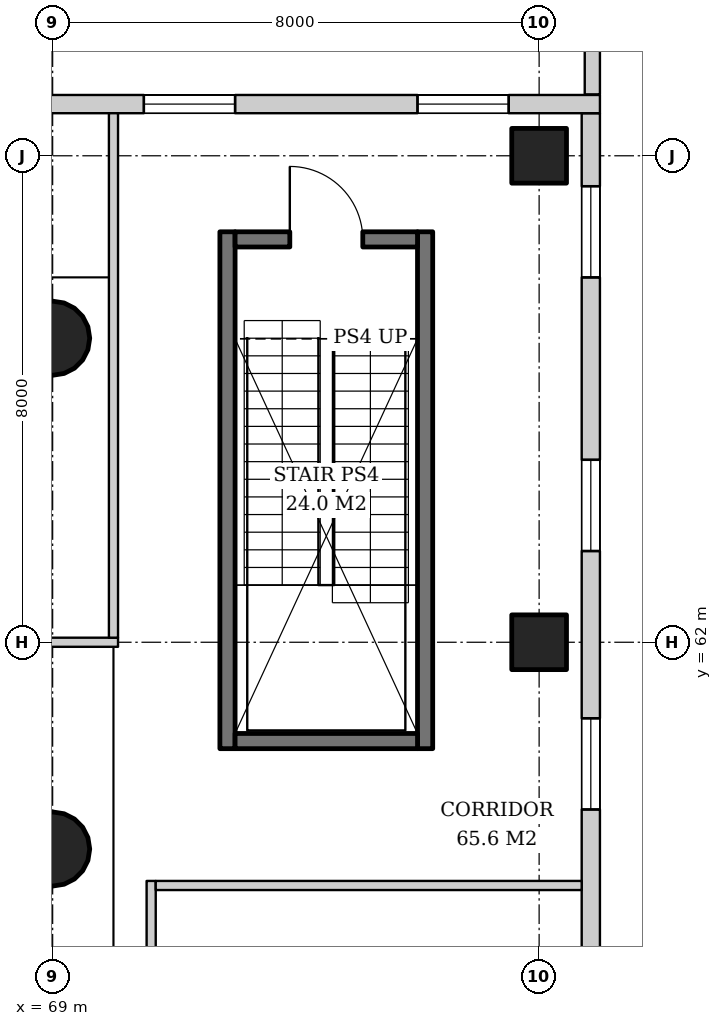
"""IFC4 building model, lengths in metres.
Left out: names, types, materials, properties, quantities, classifications, styles, units other than length and angle.
Written with IfcOpenShell. Run it as: python <this file> out.ifc"""

import sys

from ifc_helpers import new_model, si_unit, direction, frame, frame_2d, origin, origin_2d, place, context, subcontext, project, spatial, rectangle, hollow_circle, extrude, element, fill, save


model = new_model("IFC4")
c1 = context("Model", 3, precision=1e-05, world=origin(), true_north=direction((0.0, 1.0)))
c2 = subcontext(c1, "Body", "Model", "MODEL_VIEW")
j1 = project(units=[si_unit("LENGTHUNIT", "METRE"), si_unit("PLANEANGLEUNIT", "RADIAN")], contexts=[c1])
p1 = place(None, origin())
s1 = spatial("IfcSite", under=j1, at=p1, CompositionType="ELEMENT")
p2 = place(p1, origin())
s2 = spatial("IfcBuilding", under=s1, at=p2, CompositionType="ELEMENT")
p3 = place(p2, frame((0.0, 0.0, 16.0)))
s3 = spatial("IfcBuildingStorey", under=s2, at=p3, CompositionType="ELEMENT", Elevation=16.0)
for number, where, z_axis, x_axis in (
    (1, (77.0, 62.0, 0.0), (0.0, 0.0, 1.0), (1.0, 0.0, 0.0)),
    (2, (77.0, 70.0, 0.0), (0.0, 0.0, 1.0), (1.0, 0.0, 0.0)),
):
    element("IfcColumn", number, at=place(p3, frame(where, z_axis=z_axis, x_axis=x_axis)), inside=s3, PredefinedType="COLUMN", context=c2, shape_type="SweptSolid", body=[
        extrude(rectangle(XDim=0.9, YDim=0.9, at=origin_2d()), origin(), (0.0, 0.0, 1.0), 5.0),
    ])
for number, where, z_axis, x_axis in (
    (3, (69.0, 67.0, 0.0), (0.0, 0.0, 1.0), (1.0, 0.0, 0.0)),
    (4, (69.0, 58.6, 0.0), (0.0, 0.0, 1.0), (1.0, 0.0, 0.0)),
):
    element("IfcColumn", number, at=place(p3, frame(where, z_axis=z_axis, x_axis=x_axis)), inside=s3, PredefinedType="COLUMN", context=c2, shape_type="SweptSolid", body=[
        extrude(hollow_circle(Radius=0.61, WallThickness=0.04, at=origin_2d()), origin(), (0.0, 0.0, 1.0), 5.0),
    ])
p4 = place(p3, frame((77.85, 21.3, 0.0), z_axis=(0.0, 0.0, 1.0), x_axis=(0.0, 1.0, 0.0)))
e5 = element("IfcWall", 5, at=p4, inside=s3, PredefinedType="SOLIDWALL", context=c2, shape_type="SweptSolid", body=[
    extrude(rectangle(XDim=49.4, YDim=0.3, at=frame_2d((24.7, 0.0))), origin(), (0.0, 0.0, 1.0), 4.7),
])
p5 = place(p4, frame((1.2, 0.0, 0.9)))
e6 = element("IfcOpeningElement", 6, at=p5, cuts=e5, PredefinedType="OPENING", context=c2, shape_type="SweptSolid", body=[
    extrude(rectangle(XDim=1.5, YDim=3.2, at=frame_2d((0.75, 1.6))), frame((0.0, 0.16, 0.0), z_axis=(0.0, -1.0, 0.0), x_axis=(1.0, 0.0, 0.0)), (0.0, 0.0, 1.0), 0.32),
])
p6 = place(p4, frame((5.7, 0.0, 0.9)))
e7 = element("IfcOpeningElement", 7, at=p6, cuts=e5, PredefinedType="OPENING", context=c2, shape_type="SweptSolid", body=[
    extrude(rectangle(XDim=1.5, YDim=3.2, at=frame_2d((0.75, 1.6))), frame((0.0, 0.16, 0.0), z_axis=(0.0, -1.0, 0.0), x_axis=(1.0, 0.0, 0.0)), (0.0, 0.0, 1.0), 0.32),
])
p7 = place(p4, frame((9.95, 0.0, 0.9)))
e8 = element("IfcOpeningElement", 8, at=p7, cuts=e5, PredefinedType="OPENING", context=c2, shape_type="SweptSolid", body=[
    extrude(rectangle(XDim=1.5, YDim=3.2, at=frame_2d((0.75, 1.6))), frame((0.0, 0.16, 0.0), z_axis=(0.0, -1.0, 0.0), x_axis=(1.0, 0.0, 0.0)), (0.0, 0.0, 1.0), 0.32),
])
p8 = place(p4, frame((13.95, 0.0, 0.9)))
e9 = element("IfcOpeningElement", 9, at=p8, cuts=e5, PredefinedType="OPENING", context=c2, shape_type="SweptSolid", body=[
    extrude(rectangle(XDim=1.5, YDim=3.2, at=frame_2d((0.75, 1.6))), frame((0.0, 0.16, 0.0), z_axis=(0.0, -1.0, 0.0), x_axis=(1.0, 0.0, 0.0)), (0.0, 0.0, 1.0), 0.32),
])
p9 = place(p4, frame((17.95, 0.0, 0.9)))
e10 = element("IfcOpeningElement", 10, at=p9, cuts=e5, PredefinedType="OPENING", context=c2, shape_type="SweptSolid", body=[
    extrude(rectangle(XDim=1.5, YDim=3.2, at=frame_2d((0.75, 1.6))), frame((0.0, 0.16, 0.0), z_axis=(0.0, -1.0, 0.0), x_axis=(1.0, 0.0, 0.0)), (0.0, 0.0, 1.0), 0.32),
])
p10 = place(p4, frame((21.95, 0.0, 0.9)))
e11 = element("IfcOpeningElement", 11, at=p10, cuts=e5, PredefinedType="OPENING", context=c2, shape_type="SweptSolid", body=[
    extrude(rectangle(XDim=1.5, YDim=3.2, at=frame_2d((0.75, 1.6))), frame((0.0, 0.16, 0.0), z_axis=(0.0, -1.0, 0.0), x_axis=(1.0, 0.0, 0.0)), (0.0, 0.0, 1.0), 0.32),
])
p11 = place(p4, frame((25.95, 0.0, 0.9)))
e12 = element("IfcOpeningElement", 12, at=p11, cuts=e5, PredefinedType="OPENING", context=c2, shape_type="SweptSolid", body=[
    extrude(rectangle(XDim=1.5, YDim=3.2, at=frame_2d((0.75, 1.6))), frame((0.0, 0.16, 0.0), z_axis=(0.0, -1.0, 0.0), x_axis=(1.0, 0.0, 0.0)), (0.0, 0.0, 1.0), 0.32),
])
p12 = place(p4, frame((29.95, 0.0, 0.9)))
e13 = element("IfcOpeningElement", 13, at=p12, cuts=e5, PredefinedType="OPENING", context=c2, shape_type="SweptSolid", body=[
    extrude(rectangle(XDim=1.5, YDim=3.2, at=frame_2d((0.75, 1.6))), frame((0.0, 0.16, 0.0), z_axis=(0.0, -1.0, 0.0), x_axis=(1.0, 0.0, 0.0)), (0.0, 0.0, 1.0), 0.32),
])
p13 = place(p4, frame((33.95, 0.0, 0.9)))
e14 = element("IfcOpeningElement", 14, at=p13, cuts=e5, PredefinedType="OPENING", context=c2, shape_type="SweptSolid", body=[
    extrude(rectangle(XDim=1.5, YDim=3.2, at=frame_2d((0.75, 1.6))), frame((0.0, 0.16, 0.0), z_axis=(0.0, -1.0, 0.0), x_axis=(1.0, 0.0, 0.0)), (0.0, 0.0, 1.0), 0.32),
])
p14 = place(p4, frame((37.95, 0.0, 0.9)))
e15 = element("IfcOpeningElement", 15, at=p14, cuts=e5, PredefinedType="OPENING", context=c2, shape_type="SweptSolid", body=[
    extrude(rectangle(XDim=1.5, YDim=3.2, at=frame_2d((0.75, 1.6))), frame((0.0, 0.16, 0.0), z_axis=(0.0, -1.0, 0.0), x_axis=(1.0, 0.0, 0.0)), (0.0, 0.0, 1.0), 0.32),
])
p15 = place(p4, frame((42.2, 0.0, 0.9)))
e16 = element("IfcOpeningElement", 16, at=p15, cuts=e5, PredefinedType="OPENING", context=c2, shape_type="SweptSolid", body=[
    extrude(rectangle(XDim=1.5, YDim=3.2, at=frame_2d((0.75, 1.6))), frame((0.0, 0.16, 0.0), z_axis=(0.0, -1.0, 0.0), x_axis=(1.0, 0.0, 0.0)), (0.0, 0.0, 1.0), 0.32),
])
p16 = place(p4, frame((46.7, 0.0, 0.9)))
e17 = element("IfcOpeningElement", 17, at=p16, cuts=e5, PredefinedType="OPENING", context=c2, shape_type="SweptSolid", body=[
    extrude(rectangle(XDim=1.5, YDim=3.2, at=frame_2d((0.75, 1.6))), frame((0.0, 0.16, 0.0), z_axis=(0.0, -1.0, 0.0), x_axis=(1.0, 0.0, 0.0)), (0.0, 0.0, 1.0), 0.32),
])
p17 = place(p3, frame((78.0, 70.85, 0.0), z_axis=(0.0, 0.0, 1.0), x_axis=(-1.0, 0.0, 0.0)))
e18 = element("IfcWall", 18, at=p17, inside=s3, PredefinedType="SOLIDWALL", context=c2, shape_type="SweptSolid", body=[
    extrude(rectangle(XDim=58.0, YDim=0.3, at=frame_2d((29.0, 0.0))), origin(), (0.0, 0.0, 1.0), 4.7),
])
p18 = place(p17, frame((1.5, 0.0, 0.9)))
e19 = element("IfcOpeningElement", 19, at=p18, cuts=e18, PredefinedType="OPENING", context=c2, shape_type="SweptSolid", body=[
    extrude(rectangle(XDim=1.5, YDim=3.2, at=frame_2d((0.75, 1.6))), frame((0.0, 0.16, 0.0), z_axis=(0.0, -1.0, 0.0), x_axis=(1.0, 0.0, 0.0)), (0.0, 0.0, 1.0), 0.32),
])
p19 = place(p17, frame((6.0, 0.0, 0.9)))
e20 = element("IfcOpeningElement", 20, at=p19, cuts=e18, PredefinedType="OPENING", context=c2, shape_type="SweptSolid", body=[
    extrude(rectangle(XDim=1.5, YDim=3.2, at=frame_2d((0.75, 1.6))), frame((0.0, 0.16, 0.0), z_axis=(0.0, -1.0, 0.0), x_axis=(1.0, 0.0, 0.0)), (0.0, 0.0, 1.0), 0.32),
])
p20 = place(p17, frame((10.25, 0.0, 0.9)))
e21 = element("IfcOpeningElement", 21, at=p20, cuts=e18, PredefinedType="OPENING", context=c2, shape_type="SweptSolid", body=[
    extrude(rectangle(XDim=1.5, YDim=3.2, at=frame_2d((0.75, 1.6))), frame((0.0, 0.16, 0.0), z_axis=(0.0, -1.0, 0.0), x_axis=(1.0, 0.0, 0.0)), (0.0, 0.0, 1.0), 0.32),
])
p21 = place(p17, frame((14.25, 0.0, 0.9)))
e22 = element("IfcOpeningElement", 22, at=p21, cuts=e18, PredefinedType="OPENING", context=c2, shape_type="SweptSolid", body=[
    extrude(rectangle(XDim=1.5, YDim=3.2, at=frame_2d((0.75, 1.6))), frame((0.0, 0.16, 0.0), z_axis=(0.0, -1.0, 0.0), x_axis=(1.0, 0.0, 0.0)), (0.0, 0.0, 1.0), 0.32),
])
p22 = place(p17, frame((18.25, 0.0, 0.9)))
e23 = element("IfcOpeningElement", 23, at=p22, cuts=e18, PredefinedType="OPENING", context=c2, shape_type="SweptSolid", body=[
    extrude(rectangle(XDim=1.5, YDim=3.2, at=frame_2d((0.75, 1.6))), frame((0.0, 0.16, 0.0), z_axis=(0.0, -1.0, 0.0), x_axis=(1.0, 0.0, 0.0)), (0.0, 0.0, 1.0), 0.32),
])
p23 = place(p17, frame((22.25, 0.0, 0.9)))
e24 = element("IfcOpeningElement", 24, at=p23, cuts=e18, PredefinedType="OPENING", context=c2, shape_type="SweptSolid", body=[
    extrude(rectangle(XDim=1.5, YDim=3.2, at=frame_2d((0.75, 1.6))), frame((0.0, 0.16, 0.0), z_axis=(0.0, -1.0, 0.0), x_axis=(1.0, 0.0, 0.0)), (0.0, 0.0, 1.0), 0.32),
])
p24 = place(p17, frame((26.1, 0.0, 0.0)))
e25 = element("IfcOpeningElement", 25, at=p24, cuts=e18, PredefinedType="OPENING", context=c2, shape_type="SweptSolid", body=[
    extrude(rectangle(XDim=1.8, YDim=2.4, at=frame_2d((0.9, 1.2))), frame((0.0, 0.16, 0.0), z_axis=(0.0, -1.0, 0.0), x_axis=(1.0, 0.0, 0.0)), (0.0, 0.0, 1.0), 0.32),
])
p25 = place(p17, frame((30.25, 0.0, 0.9)))
e26 = element("IfcOpeningElement", 26, at=p25, cuts=e18, PredefinedType="OPENING", context=c2, shape_type="SweptSolid", body=[
    extrude(rectangle(XDim=1.5, YDim=3.2, at=frame_2d((0.75, 1.6))), frame((0.0, 0.16, 0.0), z_axis=(0.0, -1.0, 0.0), x_axis=(1.0, 0.0, 0.0)), (0.0, 0.0, 1.0), 0.32),
])
p26 = place(p17, frame((34.25, 0.0, 0.9)))
e27 = element("IfcOpeningElement", 27, at=p26, cuts=e18, PredefinedType="OPENING", context=c2, shape_type="SweptSolid", body=[
    extrude(rectangle(XDim=1.5, YDim=3.2, at=frame_2d((0.75, 1.6))), frame((0.0, 0.16, 0.0), z_axis=(0.0, -1.0, 0.0), x_axis=(1.0, 0.0, 0.0)), (0.0, 0.0, 1.0), 0.32),
])
p27 = place(p17, frame((38.25, 0.0, 0.9)))
e28 = element("IfcOpeningElement", 28, at=p27, cuts=e18, PredefinedType="OPENING", context=c2, shape_type="SweptSolid", body=[
    extrude(rectangle(XDim=1.5, YDim=3.2, at=frame_2d((0.75, 1.6))), frame((0.0, 0.16, 0.0), z_axis=(0.0, -1.0, 0.0), x_axis=(1.0, 0.0, 0.0)), (0.0, 0.0, 1.0), 0.32),
])
p28 = place(p17, frame((42.25, 0.0, 0.9)))
e29 = element("IfcOpeningElement", 29, at=p28, cuts=e18, PredefinedType="OPENING", context=c2, shape_type="SweptSolid", body=[
    extrude(rectangle(XDim=1.5, YDim=3.2, at=frame_2d((0.75, 1.6))), frame((0.0, 0.16, 0.0), z_axis=(0.0, -1.0, 0.0), x_axis=(1.0, 0.0, 0.0)), (0.0, 0.0, 1.0), 0.32),
])
p29 = place(p17, frame((46.25, 0.0, 0.9)))
e30 = element("IfcOpeningElement", 30, at=p29, cuts=e18, PredefinedType="OPENING", context=c2, shape_type="SweptSolid", body=[
    extrude(rectangle(XDim=1.5, YDim=3.2, at=frame_2d((0.75, 1.6))), frame((0.0, 0.16, 0.0), z_axis=(0.0, -1.0, 0.0), x_axis=(1.0, 0.0, 0.0)), (0.0, 0.0, 1.0), 0.32),
])
p30 = place(p17, frame((50.5, 0.0, 0.9)))
e31 = element("IfcOpeningElement", 31, at=p30, cuts=e18, PredefinedType="OPENING", context=c2, shape_type="SweptSolid", body=[
    extrude(rectangle(XDim=1.5, YDim=3.2, at=frame_2d((0.75, 1.6))), frame((0.0, 0.16, 0.0), z_axis=(0.0, -1.0, 0.0), x_axis=(1.0, 0.0, 0.0)), (0.0, 0.0, 1.0), 0.32),
])
p31 = place(p17, frame((55.0, 0.0, 0.9)))
e32 = element("IfcOpeningElement", 32, at=p31, cuts=e18, PredefinedType="OPENING", context=c2, shape_type="SweptSolid", body=[
    extrude(rectangle(XDim=1.5, YDim=3.2, at=frame_2d((0.75, 1.6))), frame((0.0, 0.16, 0.0), z_axis=(0.0, -1.0, 0.0), x_axis=(1.0, 0.0, 0.0)), (0.0, 0.0, 1.0), 0.32),
])
p32 = place(p3, frame((77.875, 71.01, 0.0), z_axis=(0.0, 0.0, 1.0), x_axis=(0.0, 1.0, 0.0)))
e33 = element("IfcWall", 33, at=p32, inside=s3, PredefinedType="PARAPET", context=c2, shape_type="SweptSolid", body=[
    extrude(rectangle(XDim=7.74, YDim=0.25, at=frame_2d((3.87, 0.0))), origin(), (0.0, 0.0, 1.0), 1.1),
])
for number, where, z_axis, x_axis in (
    (34, (71.875, 60.25, 0.0), (0.0, 0.0, 1.0), (0.0, 1.0, 0.0)),
    (35, (75.125, 60.25, 0.0), (0.0, 0.0, 1.0), (0.0, 1.0, 0.0)),
):
    element("IfcWall", number, at=place(p3, frame(where, z_axis=z_axis, x_axis=x_axis)), inside=s3, PredefinedType="SOLIDWALL", context=c2, shape_type="SweptSolid", body=[
        extrude(rectangle(XDim=8.5, YDim=0.25, at=frame_2d((4.25, 0.0))), origin(), (0.0, 0.0, 1.0), 4.7),
    ])
p33 = place(p3, frame((72.0, 60.375, 0.0), z_axis=(0.0, 0.0, 1.0), x_axis=(1.0, 0.0, 0.0)))
e36 = element("IfcWall", 36, at=p33, inside=s3, PredefinedType="SOLIDWALL", context=c2, shape_type="SweptSolid", body=[
    extrude(rectangle(XDim=3.0, YDim=0.25, at=frame_2d((1.5, 0.0))), origin(), (0.0, 0.0, 1.0), 4.7),
])
p34 = place(p3, frame((72.0, 68.625, 0.0), z_axis=(0.0, 0.0, 1.0), x_axis=(1.0, 0.0, 0.0)))
e37 = element("IfcWall", 37, at=p34, inside=s3, PredefinedType="SOLIDWALL", context=c2, shape_type="SweptSolid", body=[
    extrude(rectangle(XDim=3.0, YDim=0.25, at=frame_2d((1.5, 0.0))), origin(), (0.0, 0.0, 1.0), 4.7),
])
p35 = place(p34, frame((0.9, 0.0, 0.0)))
e38 = element("IfcOpeningElement", 38, at=p35, cuts=e37, PredefinedType="OPENING", context=c2, shape_type="SweptSolid", body=[
    extrude(rectangle(XDim=1.2, YDim=2.1, at=frame_2d((0.6, 1.05))), frame((0.0, 0.135, 0.0), z_axis=(0.0, -1.0, 0.0), x_axis=(1.0, 0.0, 0.0)), (0.0, 0.0, 1.0), 0.27),
])
p36 = place(p3, frame((70.62, 33.925, 0.0), z_axis=(0.0, 0.0, 1.0), x_axis=(0.0, 1.0, 0.0)))
e39 = element("IfcWall", 39, at=p36, inside=s3, PredefinedType="PARTITIONING", context=c2, shape_type="SweptSolid", body=[
    extrude(rectangle(XDim=24.15, YDim=0.15, at=frame_2d((12.075, 0.0))), origin(), (0.0, 0.0, 1.0), 4.7),
])
p37 = place(p36, frame((11.325, 0.0, 0.0)))
e40 = element("IfcOpeningElement", 40, at=p37, cuts=e39, PredefinedType="OPENING", context=c2, shape_type="SweptSolid", body=[
    extrude(rectangle(XDim=1.5, YDim=2.1, at=frame_2d((0.75, 1.05))), frame((0.0, 0.085, 0.0), z_axis=(0.0, -1.0, 0.0), x_axis=(1.0, 0.0, 0.0)), (0.0, 0.0, 1.0), 0.17),
])
p38 = place(p3, frame((70.695, 58.0, 0.0), z_axis=(0.0, 0.0, 1.0), x_axis=(1.0, 0.0, 0.0)))
e41 = element("IfcWall", 41, at=p38, inside=s3, PredefinedType="PARTITIONING", context=c2, shape_type="SweptSolid", body=[
    extrude(rectangle(XDim=7.005, YDim=0.15, at=frame_2d((3.502, 0.0))), origin(), (0.0, 0.0, 1.0), 4.7),
])
p39 = place(p3, frame((19.925, 62.0, 0.0), z_axis=(0.0, 0.0, 1.0), x_axis=(1.0, 0.0, 0.0)))
e42 = element("IfcWall", 42, at=p39, inside=s3, PredefinedType="PARTITIONING", context=c2, shape_type="SweptSolid", body=[
    extrude(rectangle(XDim=50.15, YDim=0.15, at=frame_2d((25.075, 0.0))), origin(), (0.0, 0.0, 1.0), 3.688),
])
p40 = place(p39, frame((15.875, 0.0, 0.0)))
e43 = element("IfcOpeningElement", 43, at=p40, cuts=e42, PredefinedType="OPENING", context=c2, shape_type="SweptSolid", body=[
    extrude(rectangle(XDim=1.8, YDim=2.4, at=frame_2d((0.9, 1.2))), frame((0.0, 0.085, 0.0), z_axis=(0.0, -1.0, 0.0), x_axis=(1.0, 0.0, 0.0)), (0.0, 0.0, 1.0), 0.17),
])
p41 = place(p39, frame((39.875, 0.0, 0.0)))
e44 = element("IfcOpeningElement", 44, at=p41, cuts=e42, PredefinedType="OPENING", context=c2, shape_type="SweptSolid", body=[
    extrude(rectangle(XDim=1.0, YDim=2.1, at=frame_2d((0.5, 1.05))), frame((0.0, 0.085, 0.0), z_axis=(0.0, -1.0, 0.0), x_axis=(1.0, 0.0, 0.0)), (0.0, 0.0, 1.0), 0.17),
])
p42 = place(p3, frame((70.0, 62.075, 0.0), z_axis=(0.0, 0.0, 1.0), x_axis=(0.0, 1.0, 0.0)))
e45 = element("IfcWall", 45, at=p42, inside=s3, PredefinedType="PARTITIONING", context=c2, shape_type="SweptSolid", body=[
    extrude(rectangle(XDim=8.625, YDim=0.15, at=frame_2d((4.312, 0.0))), origin(), (0.0, 0.0, 1.0), 4.7),
])
p43 = place(p14, origin())
e46 = element("IfcWindow", 46, at=p43, inside=s3, PartitioningType="SINGLE_PANEL", PredefinedType="WINDOW", context=c2, shape_type="SweptSolid", body=[
    extrude(rectangle(XDim=1.5, YDim=3.2, at=frame_2d((0.75, 1.6))), frame((0.0, 0.03, 0.0), z_axis=(0.0, -1.0, 0.0), x_axis=(1.0, 0.0, 0.0)), (0.0, 0.0, 1.0), 0.06),
])
fill(e15, e46)
p44 = place(p15, origin())
e47 = element("IfcWindow", 47, at=p44, inside=s3, PartitioningType="SINGLE_PANEL", PredefinedType="WINDOW", context=c2, shape_type="SweptSolid", body=[
    extrude(rectangle(XDim=1.5, YDim=3.2, at=frame_2d((0.75, 1.6))), frame((0.0, 0.03, 0.0), z_axis=(0.0, -1.0, 0.0), x_axis=(1.0, 0.0, 0.0)), (0.0, 0.0, 1.0), 0.06),
])
fill(e16, e47)
p45 = place(p16, origin())
e48 = element("IfcWindow", 48, at=p45, inside=s3, PartitioningType="SINGLE_PANEL", PredefinedType="WINDOW", context=c2, shape_type="SweptSolid", body=[
    extrude(rectangle(XDim=1.5, YDim=3.2, at=frame_2d((0.75, 1.6))), frame((0.0, 0.03, 0.0), z_axis=(0.0, -1.0, 0.0), x_axis=(1.0, 0.0, 0.0)), (0.0, 0.0, 1.0), 0.06),
])
fill(e17, e48)
p46 = place(p18, origin())
e49 = element("IfcWindow", 49, at=p46, inside=s3, PartitioningType="SINGLE_PANEL", PredefinedType="WINDOW", context=c2, shape_type="SweptSolid", body=[
    extrude(rectangle(XDim=1.5, YDim=3.2, at=frame_2d((0.75, 1.6))), frame((0.0, 0.03, 0.0), z_axis=(0.0, -1.0, 0.0), x_axis=(1.0, 0.0, 0.0)), (0.0, 0.0, 1.0), 0.06),
])
fill(e19, e49)
p47 = place(p19, origin())
e50 = element("IfcWindow", 50, at=p47, inside=s3, PartitioningType="SINGLE_PANEL", PredefinedType="WINDOW", context=c2, shape_type="SweptSolid", body=[
    extrude(rectangle(XDim=1.5, YDim=3.2, at=frame_2d((0.75, 1.6))), frame((0.0, 0.03, 0.0), z_axis=(0.0, -1.0, 0.0), x_axis=(1.0, 0.0, 0.0)), (0.0, 0.0, 1.0), 0.06),
])
fill(e20, e50)
p48 = place(p35, origin())
e51 = element("IfcDoor", 51, at=p48, inside=s3, OperationType="SINGLE_SWING_LEFT", PredefinedType="DOOR", context=c2, shape_type="SweptSolid", body=[
    extrude(rectangle(XDim=1.2, YDim=2.1, at=frame_2d((0.6, 1.05))), frame((0.0, 0.025, 0.0), z_axis=(0.0, -1.0, 0.0), x_axis=(1.0, 0.0, 0.0)), (0.0, 0.0, 1.0), 0.05),
])
fill(e38, e51)
save(model, sys.argv[1])
